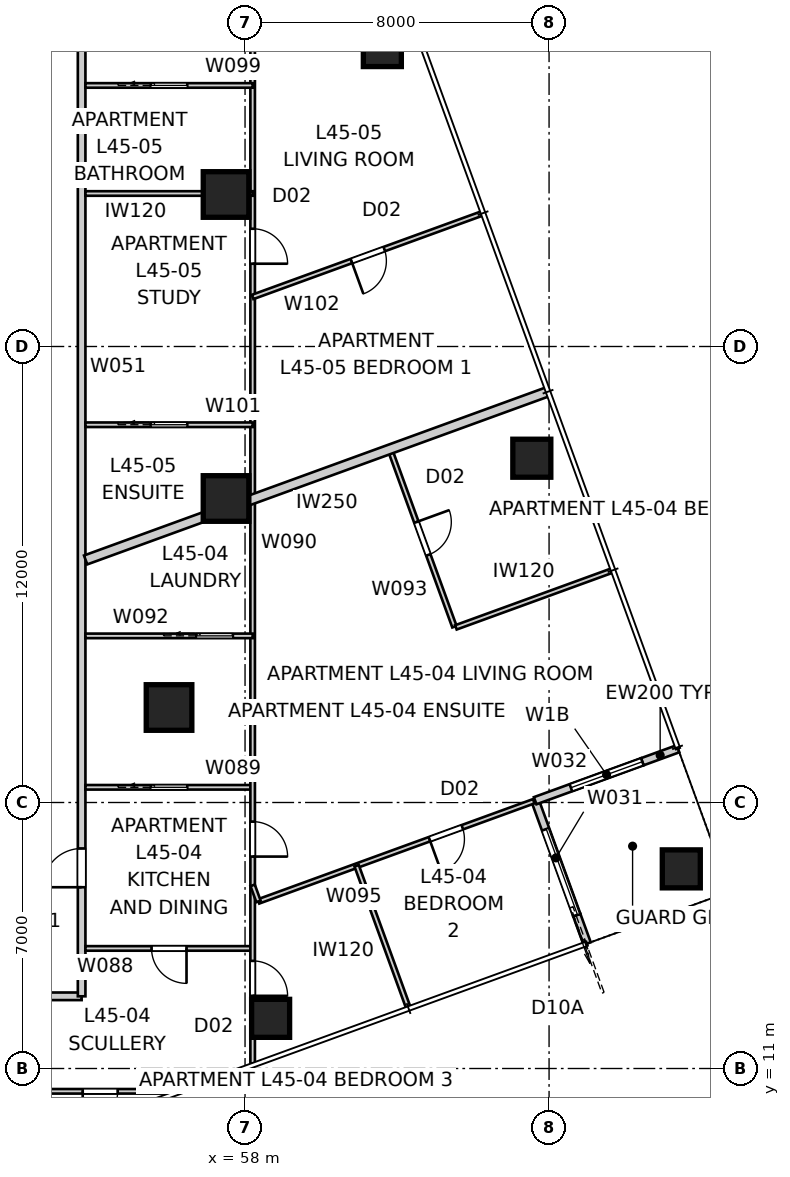
"""IFC4 building model, lengths in metres.
Left out: names, types, materials, properties, quantities, classifications, styles, units other than length and angle.
Written with IfcOpenShell. Run it as: python <this file> out.ifc"""

import sys

from ifc_helpers import new_model, si_unit, direction, frame, frame_2d, origin, origin_2d, place, context, subcontext, project, spatial, rectangle, extrude, element, fill, save


model = new_model("IFC4")
c1 = context("Model", 3, precision=1e-05, world=origin(), true_north=direction((0.0, 1.0)))
c2 = subcontext(c1, "Body", "Model", "MODEL_VIEW")
j1 = project(units=[si_unit("LENGTHUNIT", "METRE"), si_unit("PLANEANGLEUNIT", "RADIAN")], contexts=[c1])
p1 = place(None, origin())
s1 = spatial("IfcSite", under=j1, at=p1, CompositionType="ELEMENT")
p2 = place(p1, origin())
s2 = spatial("IfcBuilding", under=s1, at=p2, CompositionType="ELEMENT")
p3 = place(p2, frame((0.0, 0.0, 164.2)))
s3 = spatial("IfcBuildingStorey", under=s2, at=p3, CompositionType="ELEMENT", Elevation=164.2)
for number, where, z_axis, x_axis in (
    (1, (58.673, 12.32, 0.0), (0.0, 0.0, 1.0), (1.0, 0.0, 0.0)),
    (2, (69.479, 16.253, 0.0), (0.0, 0.0, 1.0), (1.0, 0.0, 0.0)),
    (3, (65.546, 27.06, 0.0), (0.0, 0.0, 1.0), (1.0, 0.0, 0.0)),
    (4, (61.613, 37.866, 0.0), (0.0, 0.0, 1.0), (1.0, 0.0, 0.0)),
):
    element("IfcColumn", number, at=place(p3, frame(where, z_axis=z_axis, x_axis=x_axis)), inside=s3, PredefinedType="COLUMN", context=c2, shape_type="SweptSolid", body=[
        extrude(rectangle(XDim=1.0, YDim=1.0, at=origin_2d()), origin(), (0.0, 0.0, 1.0), 3.4),
    ])
for number, where, z_axis, x_axis in (
    (5, (57.5, 26.0, 0.0), (0.0, 0.0, 1.0), (1.0, 0.0, 0.0)),
    (6, (57.5, 34.0, 0.0), (0.0, 0.0, 1.0), (1.0, 0.0, 0.0)),
    (7, (56.0, 20.5, 0.0), (0.0, 0.0, 1.0), (1.0, 0.0, 0.0)),
):
    element("IfcColumn", number, at=place(p3, frame(where, z_axis=z_axis, x_axis=x_axis)), inside=s3, PredefinedType="COLUMN", context=c2, shape_type="SweptSolid", body=[
        extrude(rectangle(XDim=1.2, YDim=1.2, at=origin_2d()), origin(), (0.0, 0.0, 1.0), 3.4),
    ])
p4 = place(p3, frame((67.002, 14.288, 0.0), z_axis=(0.0, 0.0, 1.0), x_axis=(-0.342110593602, 0.939659694648, 0.0)))
e8 = element("IfcWall", 8, at=p4, inside=s3, PredefinedType="SOLIDWALL", context=c2, shape_type="SweptSolid", body=[
    extrude(rectangle(XDim=0.8, YDim=0.2, at=frame_2d((0.4, 0.0))), origin(), (0.0, 0.0, 1.0), 3.25),
])
p5 = place(p3, frame((66.729, 15.04, 0.0), z_axis=(0.0, 0.0, 1.0), x_axis=(-0.342018703306, 0.939693144909, 0.0)))
e9 = element("IfcWall", 9, at=p5, inside=s3, PredefinedType="SOLIDWALL", context=c2, shape_type="SweptSolid", body=[
    extrude(rectangle(XDim=3.2, YDim=0.2, at=frame_2d((1.6, 0.0))), origin(), (0.0, 0.0, 1.0), 2.722),
])
p6 = place(p5, origin())
e10 = element("IfcOpeningElement", 10, at=p6, cuts=e9, PredefinedType="OPENING", context=c2, shape_type="SweptSolid", body=[
    extrude(rectangle(XDim=2.4, YDim=2.1, at=frame_2d((1.2, 1.05))), frame((0.0, 0.11, 0.0), z_axis=(0.0, -1.0, 0.0), x_axis=(1.0, 0.0, 0.0)), (0.0, 0.0, 1.0), 0.22),
])
p7 = place(p3, frame((65.634, 18.047, 0.0), z_axis=(0.0, 0.0, 1.0), x_axis=(0.939712609717, 0.341965219194, 0.0)))
e11 = element("IfcWall", 11, at=p7, inside=s3, PredefinedType="SOLIDWALL", context=c2, shape_type="SweptSolid", body=[
    extrude(rectangle(XDim=3.0, YDim=0.2, at=frame_2d((1.5, 0.0))), origin(), (0.0, 0.0, 1.0), 2.722),
])
p8 = place(p7, frame((1.0, 0.0, 0.45)))
e12 = element("IfcOpeningElement", 12, at=p8, cuts=e11, PredefinedType="OPENING", context=c2, shape_type="SweptSolid", body=[
    extrude(rectangle(XDim=2.0, YDim=1.8, at=frame_2d((1.0, 0.9))), frame((0.0, 0.11, 0.0), z_axis=(0.0, -1.0, 0.0), x_axis=(1.0, 0.0, 0.0)), (0.0, 0.0, 1.0), 0.22),
])
p9 = place(p3, frame((68.453, 19.073, 0.0), z_axis=(0.0, 0.0, 1.0), x_axis=(0.939686455819, 0.342037080957, 0.0)))
e13 = element("IfcWall", 13, at=p9, inside=s3, PredefinedType="SOLIDWALL", context=c2, shape_type="SweptSolid", body=[
    extrude(rectangle(XDim=1.0, YDim=0.2, at=frame_2d((0.5, 0.0))), origin(), (0.0, 0.0, 1.0), 3.25),
])
p10 = place(p3, frame((46.308, 12.9, 0.0), z_axis=(0.0, 0.0, 1.0), x_axis=(1.0, 0.0, 0.0)))
e14 = element("IfcWall", 14, at=p10, inside=s3, PredefinedType="PARTITIONING", context=c2, shape_type="SweptSolid", body=[
    extrude(rectangle(XDim=7.392, YDim=0.2, at=frame_2d((3.696, 0.0))), origin(), (0.0, 0.0, 1.0), 3.25),
])
p11 = place(p3, frame((53.7, 12.9, 0.0), z_axis=(0.0, 0.0, 1.0), x_axis=(0.0, 1.0, 0.0)))
e15 = element("IfcWall", 15, at=p11, inside=s3, PredefinedType="PARTITIONING", context=c2, shape_type="SweptSolid", body=[
    extrude(rectangle(XDim=33.8, YDim=0.2, at=frame_2d((16.9, 0.0))), origin(), (0.0, 0.0, 1.0), 3.25),
])
p12 = place(p11, frame((29.25, 0.0, 0.0)))
e16 = element("IfcOpeningElement", 16, at=p12, cuts=e15, PredefinedType="OPENING", context=c2, shape_type="SweptSolid", body=[
    extrude(rectangle(XDim=1.02, YDim=2.1, at=frame_2d((0.51, 1.05))), frame((0.0, 0.11, 0.0), z_axis=(0.0, -1.0, 0.0), x_axis=(1.0, 0.0, 0.0)), (0.0, 0.0, 1.0), 0.22),
])
p13 = place(p11, frame((2.87, 0.0, 0.0)))
e17 = element("IfcOpeningElement", 17, at=p13, cuts=e15, PredefinedType="OPENING", context=c2, shape_type="SweptSolid", body=[
    extrude(rectangle(XDim=1.02, YDim=2.34, at=frame_2d((0.51, 1.17))), frame((0.0, 0.11, 0.0), z_axis=(0.0, -1.0, 0.0), x_axis=(1.0, 0.0, 0.0)), (0.0, 0.0, 1.0), 0.22),
])
p14 = place(p3, frame((65.973, 28.812, 0.0), z_axis=(0.0, 0.0, 1.0), x_axis=(-0.939692090592, -0.342021600019, 0.0)))
e18 = element("IfcWall", 18, at=p14, inside=s3, PredefinedType="PARTITIONING", context=c2, shape_type="SweptSolid", body=[
    extrude(rectangle(XDim=12.949, YDim=0.25, at=frame_2d((6.474, 0.0))), origin(), (0.0, 0.0, 1.0), 3.25),
])
p15 = place(p3, frame((56.281, 10.4, 0.0), z_axis=(0.0, 0.0, 1.0), x_axis=(-1.0, 0.0, 0.0)))
e19 = element("IfcWall", 19, at=p15, inside=s3, PredefinedType="PARTITIONING", context=c2, shape_type="SweptSolid", body=[
    extrude(rectangle(XDim=34.647, YDim=0.12, at=frame_2d((17.324, 0.0))), origin(), (0.0, 0.0, 1.0), 3.25),
])
p16 = place(p15, frame((29.309, 0.0, 0.0)))
e20 = element("IfcOpeningElement", 20, at=p16, cuts=e19, PredefinedType="OPENING", context=c2, shape_type="SweptSolid", body=[
    extrude(rectangle(XDim=0.92, YDim=2.34, at=frame_2d((0.46, 1.17))), frame((0.0, 0.07, 0.0), z_axis=(0.0, -1.0, 0.0), x_axis=(1.0, 0.0, 0.0)), (0.0, 0.0, 1.0), 0.14),
])
p17 = place(p15, frame((1.632, 0.0, 0.0)))
e21 = element("IfcOpeningElement", 21, at=p17, cuts=e19, PredefinedType="OPENING", context=c2, shape_type="SweptSolid", body=[
    extrude(rectangle(XDim=0.92, YDim=2.1, at=frame_2d((0.46, 1.05))), frame((0.0, 0.07, 0.0), z_axis=(0.0, -1.0, 0.0), x_axis=(1.0, 0.0, 0.0)), (0.0, 0.0, 1.0), 0.14),
])
p18 = place(p15, frame((16.938, 0.0, 0.0)))
e22 = element("IfcOpeningElement", 22, at=p18, cuts=e19, PredefinedType="OPENING", context=c2, shape_type="SweptSolid", body=[
    extrude(rectangle(XDim=0.96, YDim=2.1, at=frame_2d((0.48, 1.05))), frame((0.0, 0.07, 0.0), z_axis=(0.0, -1.0, 0.0), x_axis=(1.0, 0.0, 0.0)), (0.0, 0.0, 1.0), 0.14),
])
p19 = place(p15, frame((11.4, 0.0, 0.0)))
e23 = element("IfcOpeningElement", 23, at=p19, cuts=e19, PredefinedType="OPENING", context=c2, shape_type="SweptSolid", body=[
    extrude(rectangle(XDim=0.96, YDim=2.1, at=frame_2d((0.48, 1.05))), frame((0.0, 0.07, 0.0), z_axis=(0.0, -1.0, 0.0), x_axis=(1.0, 0.0, 0.0)), (0.0, 0.0, 1.0), 0.14),
])
p20 = place(p3, frame((58.2, 14.16, 0.0), z_axis=(0.0, 0.0, 1.0), x_axis=(-1.0, 0.0, 0.0)))
e24 = element("IfcWall", 24, at=p20, inside=s3, PredefinedType="PARTITIONING", context=c2, shape_type="SweptSolid", body=[
    extrude(rectangle(XDim=4.4, YDim=0.12, at=frame_2d((2.2, 0.0))), origin(), (0.0, 0.0, 1.0), 3.25),
])
p21 = place(p20, frame((1.74, 0.0, 0.0)))
e25 = element("IfcOpeningElement", 25, at=p21, cuts=e24, PredefinedType="OPENING", context=c2, shape_type="SweptSolid", body=[
    extrude(rectangle(XDim=0.92, YDim=2.34, at=frame_2d((0.46, 1.17))), frame((0.0, 0.07, 0.0), z_axis=(0.0, -1.0, 0.0), x_axis=(1.0, 0.0, 0.0)), (0.0, 0.0, 1.0), 0.14),
])
p22 = place(p3, frame((53.8, 18.4, 0.0), z_axis=(0.0, 0.0, 1.0), x_axis=(1.0, 0.0, 0.0)))
e26 = element("IfcWall", 26, at=p22, inside=s3, PredefinedType="PARTITIONING", context=c2, shape_type="SweptSolid", body=[
    extrude(rectangle(XDim=4.4, YDim=0.12, at=frame_2d((2.2, 0.0))), origin(), (0.0, 0.0, 1.0), 3.25),
])
p23 = place(p22, frame((1.72, 0.0, 0.0)))
e27 = element("IfcOpeningElement", 27, at=p23, cuts=e26, PredefinedType="OPENING", context=c2, shape_type="SweptSolid", body=[
    extrude(rectangle(XDim=0.96, YDim=2.1, at=frame_2d((0.48, 1.05))), frame((0.0, 0.07, 0.0), z_axis=(0.0, -1.0, 0.0), x_axis=(1.0, 0.0, 0.0)), (0.0, 0.0, 1.0), 0.14),
])
p24 = place(p3, frame((58.2, 47.266, 0.0), z_axis=(0.0, 0.0, 1.0), x_axis=(0.0, -1.0, 0.0)))
e28 = element("IfcWall", 28, at=p24, inside=s3, PredefinedType="PARTITIONING", context=c2, shape_type="SweptSolid", body=[
    extrude(rectangle(XDim=36.14, YDim=0.12, at=frame_2d((18.07, 0.0))), origin(), (0.0, 0.0, 1.0), 3.25),
])
p25 = place(p24, frame((2.227, 0.0, 0.0)))
e29 = element("IfcOpeningElement", 29, at=p25, cuts=e28, PredefinedType="OPENING", context=c2, shape_type="SweptSolid", body=[
    extrude(rectangle(XDim=0.92, YDim=2.34, at=frame_2d((0.46, 1.17))), frame((0.0, 0.07, 0.0), z_axis=(0.0, -1.0, 0.0), x_axis=(1.0, 0.0, 0.0)), (0.0, 0.0, 1.0), 0.14),
])
p26 = place(p24, frame((5.95, 0.0, 0.0)))
e30 = element("IfcOpeningElement", 30, at=p26, cuts=e28, PredefinedType="OPENING", context=c2, shape_type="SweptSolid", body=[
    extrude(rectangle(XDim=0.92, YDim=2.34, at=frame_2d((0.46, 1.17))), frame((0.0, 0.07, 0.0), z_axis=(0.0, -1.0, 0.0), x_axis=(1.0, 0.0, 0.0)), (0.0, 0.0, 1.0), 0.14),
])
p27 = place(p24, frame((29.769, 0.0, 0.0)))
e31 = element("IfcOpeningElement", 31, at=p27, cuts=e28, PredefinedType="OPENING", context=c2, shape_type="SweptSolid", body=[
    extrude(rectangle(XDim=0.92, YDim=2.34, at=frame_2d((0.46, 1.17))), frame((0.0, 0.07, 0.0), z_axis=(0.0, -1.0, 0.0), x_axis=(1.0, 0.0, 0.0)), (0.0, 0.0, 1.0), 0.14),
])
p28 = place(p24, frame((14.168, 0.0, 0.0)))
e32 = element("IfcOpeningElement", 32, at=p28, cuts=e28, PredefinedType="OPENING", context=c2, shape_type="SweptSolid", body=[
    extrude(rectangle(XDim=0.92, YDim=2.34, at=frame_2d((0.46, 1.17))), frame((0.0, 0.07, 0.0), z_axis=(0.0, -1.0, 0.0), x_axis=(1.0, 0.0, 0.0)), (0.0, 0.0, 1.0), 0.14),
])
p29 = place(p24, frame((33.434, 0.0, 0.0)))
e33 = element("IfcOpeningElement", 33, at=p29, cuts=e28, PredefinedType="OPENING", context=c2, shape_type="SweptSolid", body=[
    extrude(rectangle(XDim=0.92, YDim=2.34, at=frame_2d((0.46, 1.17))), frame((0.0, 0.07, 0.0), z_axis=(0.0, -1.0, 0.0), x_axis=(1.0, 0.0, 0.0)), (0.0, 0.0, 1.0), 0.14),
])
p30 = place(p3, frame((53.8, 22.385, 0.0), z_axis=(0.0, 0.0, 1.0), x_axis=(1.0, 0.0, 0.0)))
e34 = element("IfcWall", 34, at=p30, inside=s3, PredefinedType="PARTITIONING", context=c2, shape_type="SweptSolid", body=[
    extrude(rectangle(XDim=4.4, YDim=0.12, at=frame_2d((2.2, 0.0))), origin(), (0.0, 0.0, 1.0), 3.25),
])
p31 = place(p30, frame((2.92, 0.0, 0.0)))
e35 = element("IfcOpeningElement", 35, at=p31, cuts=e34, PredefinedType="OPENING", context=c2, shape_type="SweptSolid", body=[
    extrude(rectangle(XDim=0.96, YDim=2.1, at=frame_2d((0.48, 1.05))), frame((0.0, 0.07, 0.0), z_axis=(0.0, -1.0, 0.0), x_axis=(1.0, 0.0, 0.0)), (0.0, 0.0, 1.0), 0.14),
])
p32 = place(p3, frame((61.82, 27.268, 0.0), z_axis=(0.0, 0.0, 1.0), x_axis=(0.342040652346, -0.93968515586, 0.0)))
e36 = element("IfcWall", 36, at=p32, inside=s3, PredefinedType="PARTITIONING", context=c2, shape_type="SweptSolid", body=[
    extrude(rectangle(XDim=4.94, YDim=0.12, at=frame_2d((2.47, 0.0))), origin(), (0.0, 0.0, 1.0), 3.25),
])
p33 = place(p32, frame((2.01, 0.0, 0.0)))
e37 = element("IfcOpeningElement", 37, at=p33, cuts=e36, PredefinedType="OPENING", context=c2, shape_type="SweptSolid", body=[
    extrude(rectangle(XDim=0.92, YDim=2.34, at=frame_2d((0.46, 1.17))), frame((0.0, 0.07, 0.0), z_axis=(0.0, -1.0, 0.0), x_axis=(1.0, 0.0, 0.0)), (0.0, 0.0, 1.0), 0.14),
])
p34 = place(p3, frame((63.548, 22.608, 0.0), z_axis=(0.0, 0.0, 1.0), x_axis=(0.939688742362, 0.34203079902, 0.0)))
e38 = element("IfcWall", 38, at=p34, inside=s3, PredefinedType="PARTITIONING", context=c2, shape_type="SweptSolid", body=[
    extrude(rectangle(XDim=4.36, YDim=0.12, at=frame_2d((2.18, 0.0))), origin(), (0.0, 0.0, 1.0), 3.25),
])
p35 = place(p3, frame((65.597, 18.033, 0.0), z_axis=(0.0, 0.0, 1.0), x_axis=(-0.939687947615, -0.342032982483, 0.0)))
e39 = element("IfcWall", 39, at=p35, inside=s3, PredefinedType="PARTITIONING", context=c2, shape_type="SweptSolid", body=[
    extrude(rectangle(XDim=7.708, YDim=0.12, at=frame_2d((3.854, 0.0))), origin(), (0.0, 0.0, 1.0), 3.25),
])
p36 = place(p35, frame((2.0, 0.0, 0.0)))
e40 = element("IfcOpeningElement", 40, at=p36, cuts=e39, PredefinedType="OPENING", context=c2, shape_type="SweptSolid", body=[
    extrude(rectangle(XDim=0.92, YDim=2.34, at=frame_2d((0.46, 1.17))), frame((0.0, 0.07, 0.0), z_axis=(0.0, -1.0, 0.0), x_axis=(1.0, 0.0, 0.0)), (0.0, 0.0, 1.0), 0.14),
])
p37 = place(p3, frame((58.354, 15.397, 0.0), z_axis=(0.0, 0.0, 1.0), x_axis=(-0.342309246526, 0.939587345457, 0.0)))
e41 = element("IfcWall", 41, at=p37, inside=s3, PredefinedType="PARTITIONING", context=c2, shape_type="SweptSolid", body=[
    extrude(rectangle(XDim=0.45, YDim=0.12, at=frame_2d((0.225, 0.0))), origin(), (0.0, 0.0, 1.0), 3.25),
])
p38 = place(p3, frame((62.29, 12.615, 0.0), z_axis=(0.0, 0.0, 1.0), x_axis=(-0.342040051101, 0.939685374709, 0.0)))
e42 = element("IfcWall", 42, at=p38, inside=s3, PredefinedType="PARTITIONING", context=c2, shape_type="SweptSolid", body=[
    extrude(rectangle(XDim=3.96, YDim=0.12, at=frame_2d((1.98, 0.0))), origin(), (0.0, 0.0, 1.0), 3.25),
])
p39 = place(p3, frame((53.8, 36.87, 0.0), z_axis=(0.0, 0.0, 1.0), x_axis=(1.0, 0.0, 0.0)))
e43 = element("IfcWall", 43, at=p39, inside=s3, PredefinedType="PARTITIONING", context=c2, shape_type="SweptSolid", body=[
    extrude(rectangle(XDim=4.4, YDim=0.12, at=frame_2d((2.2, 0.0))), origin(), (0.0, 0.0, 1.0), 3.25),
])
p40 = place(p39, frame((1.72, 0.0, 0.0)))
e44 = element("IfcOpeningElement", 44, at=p40, cuts=e43, PredefinedType="OPENING", context=c2, shape_type="SweptSolid", body=[
    extrude(rectangle(XDim=0.96, YDim=2.1, at=frame_2d((0.48, 1.05))), frame((0.0, 0.07, 0.0), z_axis=(0.0, -1.0, 0.0), x_axis=(1.0, 0.0, 0.0)), (0.0, 0.0, 1.0), 0.14),
])
p41 = place(p3, frame((58.2, 34.027, 0.0), z_axis=(0.0, 0.0, 1.0), x_axis=(-1.0, 0.0, 0.0)))
e45 = element("IfcWall", 45, at=p41, inside=s3, PredefinedType="PARTITIONING", context=c2, shape_type="SweptSolid", body=[
    extrude(rectangle(XDim=4.4, YDim=0.12, at=frame_2d((2.2, 0.0))), origin(), (0.0, 0.0, 1.0), 3.25),
])
p42 = place(p3, frame((53.8, 27.941, 0.0), z_axis=(0.0, 0.0, 1.0), x_axis=(1.0, 0.0, 0.0)))
e46 = element("IfcWall", 46, at=p42, inside=s3, PredefinedType="PARTITIONING", context=c2, shape_type="SweptSolid", body=[
    extrude(rectangle(XDim=4.4, YDim=0.12, at=frame_2d((2.2, 0.0))), origin(), (0.0, 0.0, 1.0), 3.25),
])
p43 = place(p42, frame((1.72, 0.0, 0.0)))
e47 = element("IfcOpeningElement", 47, at=p43, cuts=e46, PredefinedType="OPENING", context=c2, shape_type="SweptSolid", body=[
    extrude(rectangle(XDim=0.96, YDim=2.1, at=frame_2d((0.48, 1.05))), frame((0.0, 0.07, 0.0), z_axis=(0.0, -1.0, 0.0), x_axis=(1.0, 0.0, 0.0)), (0.0, 0.0, 1.0), 0.14),
])
p44 = place(p3, frame((64.225, 33.496, 0.0), z_axis=(0.0, 0.0, 1.0), x_axis=(-0.939697777766, -0.342005974306, 0.0)))
e48 = element("IfcWall", 48, at=p44, inside=s3, PredefinedType="PARTITIONING", context=c2, shape_type="SweptSolid", body=[
    extrude(rectangle(XDim=6.412, YDim=0.12, at=frame_2d((3.206, 0.0))), origin(), (0.0, 0.0, 1.0), 3.25),
])
p45 = place(p44, frame((2.726, 0.0, 0.0)))
e49 = element("IfcOpeningElement", 49, at=p45, cuts=e48, PredefinedType="OPENING", context=c2, shape_type="SweptSolid", body=[
    extrude(rectangle(XDim=0.92, YDim=2.34, at=frame_2d((0.46, 1.17))), frame((0.0, 0.07, 0.0), z_axis=(0.0, -1.0, 0.0), x_axis=(1.0, 0.0, 0.0)), (0.0, 0.0, 1.0), 0.14),
])
p46 = place(p6, origin())
e50 = element("IfcDoor", 50, at=p46, inside=s3, OperationType="SLIDING_TO_LEFT", PredefinedType="DOOR", context=c2, shape_type="SweptSolid", body=[
    extrude(rectangle(XDim=2.4, YDim=2.1, at=frame_2d((1.2, 1.05))), frame((0.0, 0.025, 0.0), z_axis=(0.0, -1.0, 0.0), x_axis=(1.0, 0.0, 0.0)), (0.0, 0.0, 1.0), 0.05),
])
fill(e10, e50)
p47 = place(p8, origin())
e51 = element("IfcWindow", 51, at=p47, inside=s3, PartitioningType="SINGLE_PANEL", PredefinedType="WINDOW", context=c2, shape_type="SweptSolid", body=[
    extrude(rectangle(XDim=2.0, YDim=1.8, at=frame_2d((1.0, 0.9))), frame((0.0, 0.03, 0.0), z_axis=(0.0, -1.0, 0.0), x_axis=(1.0, 0.0, 0.0)), (0.0, 0.0, 1.0), 0.06),
])
fill(e12, e51)
p48 = place(p13, origin())
e52 = element("IfcDoor", 52, at=p48, inside=s3, OperationType="SINGLE_SWING_LEFT", PredefinedType="DOOR", context=c2, shape_type="SweptSolid", body=[
    extrude(rectangle(XDim=1.02, YDim=2.34, at=frame_2d((0.51, 1.17))), frame((0.0, 0.025, 0.0), z_axis=(0.0, -1.0, 0.0), x_axis=(1.0, 0.0, 0.0)), (0.0, 0.0, 1.0), 0.05),
])
fill(e17, e52)
p49 = place(p21, origin())
e53 = element("IfcDoor", 53, at=p49, inside=s3, OperationType="SINGLE_SWING_LEFT", PredefinedType="DOOR", context=c2, shape_type="SweptSolid", body=[
    extrude(rectangle(XDim=0.92, YDim=2.34, at=frame_2d((0.46, 1.17))), frame((0.0, 0.025, 0.0), z_axis=(0.0, -1.0, 0.0), x_axis=(1.0, 0.0, 0.0)), (0.0, 0.0, 1.0), 0.05),
])
fill(e25, e53)
p50 = place(p23, origin())
e54 = element("IfcDoor", 54, at=p50, inside=s3, OperationType="SLIDING_TO_LEFT", PredefinedType="DOOR", context=c2, shape_type="SweptSolid", body=[
    extrude(rectangle(XDim=0.96, YDim=2.1, at=frame_2d((0.48, 1.05))), frame((0.0, 0.025, 0.0), z_axis=(0.0, -1.0, 0.0), x_axis=(1.0, 0.0, 0.0)), (0.0, 0.0, 1.0), 0.05),
])
fill(e27, e54)
p51 = place(p27, origin())
e55 = element("IfcDoor", 55, at=p51, inside=s3, OperationType="SINGLE_SWING_RIGHT", PredefinedType="DOOR", context=c2, shape_type="SweptSolid", body=[
    extrude(rectangle(XDim=0.92, YDim=2.34, at=frame_2d((0.46, 1.17))), frame((0.0, 0.025, 0.0), z_axis=(0.0, -1.0, 0.0), x_axis=(1.0, 0.0, 0.0)), (0.0, 0.0, 1.0), 0.05),
])
fill(e31, e55)
p52 = place(p40, origin())
e56 = element("IfcDoor", 56, at=p52, inside=s3, OperationType="SLIDING_TO_LEFT", PredefinedType="DOOR", context=c2, shape_type="SweptSolid", body=[
    extrude(rectangle(XDim=0.96, YDim=2.1, at=frame_2d((0.48, 1.05))), frame((0.0, 0.025, 0.0), z_axis=(0.0, -1.0, 0.0), x_axis=(1.0, 0.0, 0.0)), (0.0, 0.0, 1.0), 0.05),
])
fill(e44, e56)
p53 = place(p45, origin())
e57 = element("IfcDoor", 57, at=p53, inside=s3, OperationType="SINGLE_SWING_RIGHT", PredefinedType="DOOR", context=c2, shape_type="SweptSolid", body=[
    extrude(rectangle(XDim=0.92, YDim=2.34, at=frame_2d((0.46, 1.17))), frame((0.0, 0.025, 0.0), z_axis=(0.0, -1.0, 0.0), x_axis=(1.0, 0.0, 0.0)), (0.0, 0.0, 1.0), 0.05),
])
fill(e49, e57)
p54 = place(p28, origin())
e58 = element("IfcDoor", 58, at=p54, inside=s3, OperationType="SINGLE_SWING_RIGHT", PredefinedType="DOOR", context=c2, shape_type="SweptSolid", body=[
    extrude(rectangle(XDim=0.92, YDim=2.34, at=frame_2d((0.46, 1.17))), frame((0.0, 0.025, 0.0), z_axis=(0.0, -1.0, 0.0), x_axis=(1.0, 0.0, 0.0)), (0.0, 0.0, 1.0), 0.05),
])
fill(e32, e58)
p55 = place(p17, origin())
e59 = element("IfcDoor", 59, at=p55, inside=s3, OperationType="SINGLE_SWING_RIGHT", PredefinedType="DOOR", context=c2, shape_type="SweptSolid", body=[
    extrude(rectangle(XDim=0.92, YDim=2.1, at=frame_2d((0.46, 1.05))), frame((0.0, 0.025, 0.0), z_axis=(0.0, -1.0, 0.0), x_axis=(1.0, 0.0, 0.0)), (0.0, 0.0, 1.0), 0.05),
])
fill(e21, e59)
p56 = place(p29, origin())
e60 = element("IfcDoor", 60, at=p56, inside=s3, OperationType="SINGLE_SWING_RIGHT", PredefinedType="DOOR", context=c2, shape_type="SweptSolid", body=[
    extrude(rectangle(XDim=0.92, YDim=2.34, at=frame_2d((0.46, 1.17))), frame((0.0, 0.025, 0.0), z_axis=(0.0, -1.0, 0.0), x_axis=(1.0, 0.0, 0.0)), (0.0, 0.0, 1.0), 0.05),
])
fill(e33, e60)
p57 = place(p31, origin())
e61 = element("IfcDoor", 61, at=p57, inside=s3, OperationType="SLIDING_TO_LEFT", PredefinedType="DOOR", context=c2, shape_type="SweptSolid", body=[
    extrude(rectangle(XDim=0.96, YDim=2.1, at=frame_2d((0.48, 1.05))), frame((0.0, 0.025, 0.0), z_axis=(0.0, -1.0, 0.0), x_axis=(1.0, 0.0, 0.0)), (0.0, 0.0, 1.0), 0.05),
])
fill(e35, e61)
p58 = place(p36, origin())
e62 = element("IfcDoor", 62, at=p58, inside=s3, OperationType="SINGLE_SWING_RIGHT", PredefinedType="DOOR", context=c2, shape_type="SweptSolid", body=[
    extrude(rectangle(XDim=0.92, YDim=2.34, at=frame_2d((0.46, 1.17))), frame((0.0, 0.025, 0.0), z_axis=(0.0, -1.0, 0.0), x_axis=(1.0, 0.0, 0.0)), (0.0, 0.0, 1.0), 0.05),
])
fill(e40, e62)
p59 = place(p33, origin())
e63 = element("IfcDoor", 63, at=p59, inside=s3, OperationType="SINGLE_SWING_LEFT", PredefinedType="DOOR", context=c2, shape_type="SweptSolid", body=[
    extrude(rectangle(XDim=0.92, YDim=2.34, at=frame_2d((0.46, 1.17))), frame((0.0, 0.025, 0.0), z_axis=(0.0, -1.0, 0.0), x_axis=(1.0, 0.0, 0.0)), (0.0, 0.0, 1.0), 0.05),
])
fill(e37, e63)
p60 = place(p43, origin())
e64 = element("IfcDoor", 64, at=p60, inside=s3, OperationType="SLIDING_TO_LEFT", PredefinedType="DOOR", context=c2, shape_type="SweptSolid", body=[
    extrude(rectangle(XDim=0.96, YDim=2.1, at=frame_2d((0.48, 1.05))), frame((0.0, 0.025, 0.0), z_axis=(0.0, -1.0, 0.0), x_axis=(1.0, 0.0, 0.0)), (0.0, 0.0, 1.0), 0.05),
])
fill(e47, e64)
save(model, sys.argv[1])
